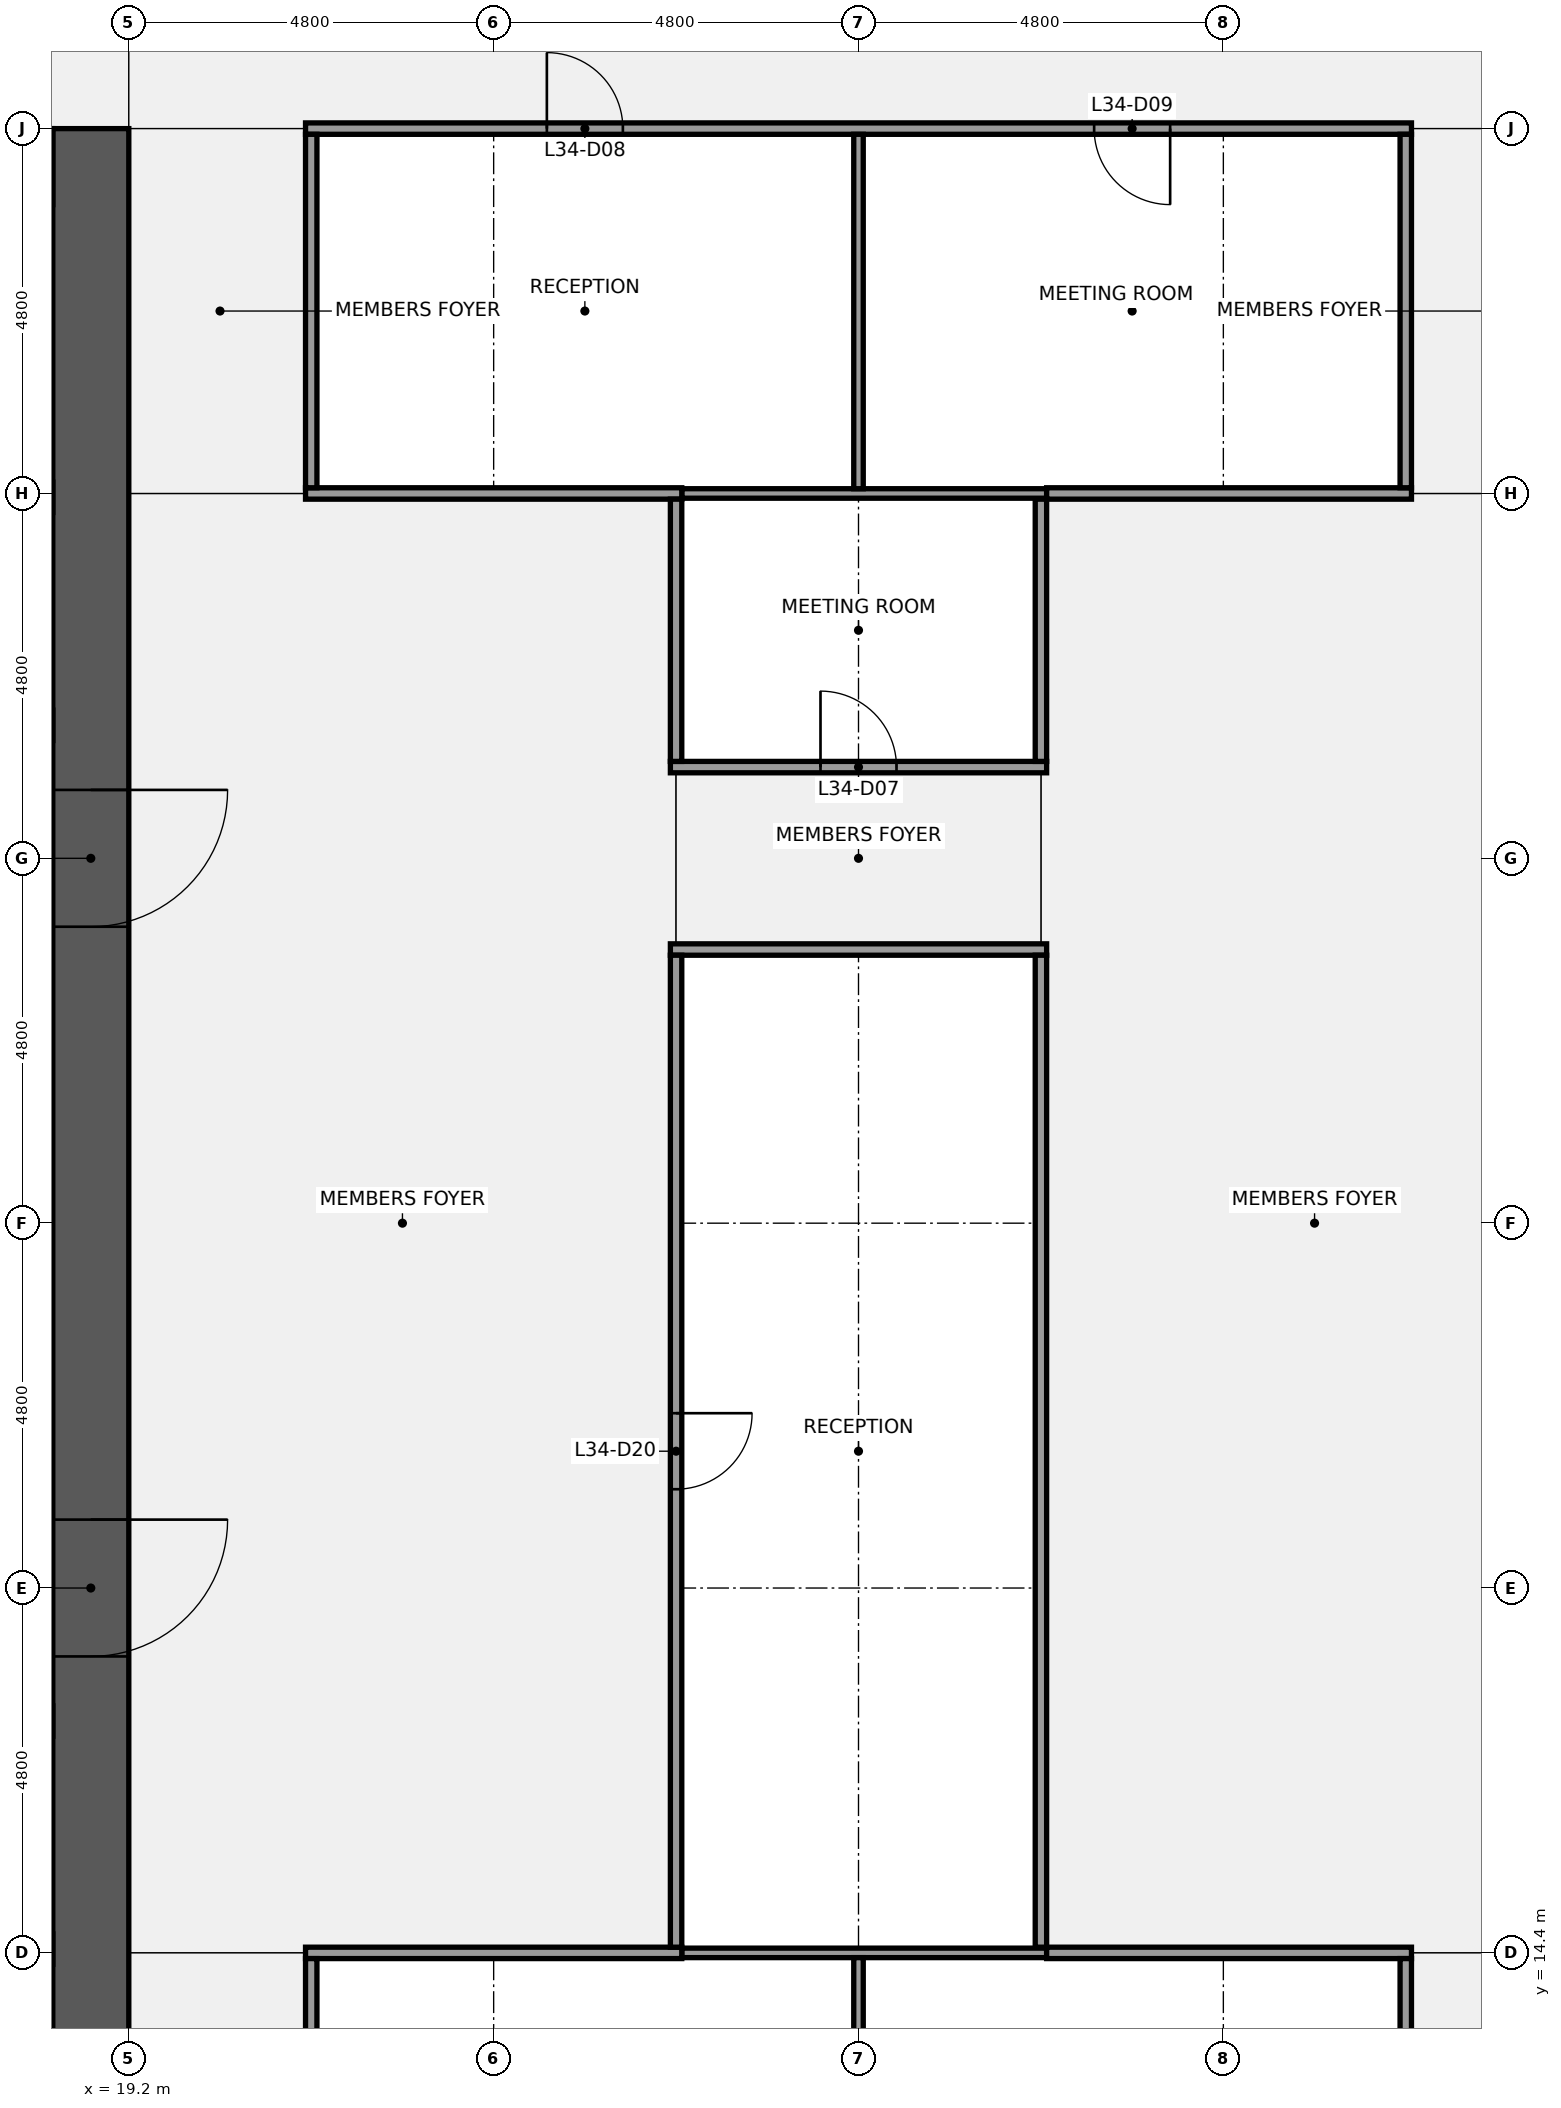
"""IFC4 building model, lengths in metres.
Left out: names, types, materials, properties, quantities, classifications, styles, units other than length and angle.
Written with IfcOpenShell. Run it as: python <this file> out.ifc"""

import sys

from ifc_helpers import new_model, si_unit, direction, frame, frame_2d, origin, place, context, subcontext, project, spatial, rectangle, extrude, element, fill, save


model = new_model("IFC4")
c1 = context("Model", 3, precision=1e-05, world=origin(), true_north=direction((0.0, 1.0)))
c2 = subcontext(c1, "Body", "Model", "MODEL_VIEW")
j1 = project(units=[si_unit("LENGTHUNIT", "METRE"), si_unit("PLANEANGLEUNIT", "RADIAN")], contexts=[c1])
p1 = place(None, origin())
s1 = spatial("IfcSite", under=j1, at=p1, CompositionType="ELEMENT")
p2 = place(p1, origin())
s2 = spatial("IfcBuilding", under=s1, at=p2, CompositionType="ELEMENT")
p3 = place(p2, frame((0.0, 0.0, 156.1)))
s3 = spatial("IfcBuildingStorey", under=s2, at=p3, CompositionType="ELEMENT", Elevation=156.1)
p4 = place(p3, frame((18.7, 38.4, 0.0), z_axis=(0.0, 0.0, 1.0), x_axis=(0.0, -1.0, 0.0)))
e1 = element("IfcWall", 1, at=p4, inside=s3, PredefinedType="SHEAR", context=c2, shape_type="SweptSolid", body=[
    extrude(rectangle(XDim=28.8, YDim=1.0, at=frame_2d((14.4, 0.0))), origin(), (0.0, 0.0, 1.0), 3.84),
])
p5 = place(p4, frame((18.3, 0.0, 0.0)))
e2 = element("IfcOpeningElement", 2, at=p5, cuts=e1, PredefinedType="OPENING", context=c2, shape_type="SweptSolid", body=[
    extrude(rectangle(XDim=1.8, YDim=2.1, at=frame_2d((0.9, 1.05))), frame((0.0, 0.51, 0.0), z_axis=(0.0, -1.0, 0.0), x_axis=(1.0, 0.0, 0.0)), (0.0, 0.0, 1.0), 1.02),
])
p6 = place(p4, frame((8.7, 0.0, 0.0)))
e3 = element("IfcOpeningElement", 3, at=p6, cuts=e1, PredefinedType="OPENING", context=c2, shape_type="SweptSolid", body=[
    extrude(rectangle(XDim=1.8, YDim=2.1, at=frame_2d((0.9, 1.05))), frame((0.0, 0.51, 0.0), z_axis=(0.0, -1.0, 0.0), x_axis=(1.0, 0.0, 0.0)), (0.0, 0.0, 1.0), 1.02),
])
p7 = place(p3, frame((1.0, 14.45, 0.0), z_axis=(0.0, 0.0, 1.0), x_axis=(1.0, 0.0, 0.0)))
e4 = element("IfcWall", 4, at=p7, inside=s3, PredefinedType="SHEAR", context=c2, shape_type="SweptSolid", body=[
    extrude(rectangle(XDim=17.2, YDim=0.4, at=frame_2d((8.6, 0.0))), origin(), (0.0, 0.0, 1.0), 3.84),
])
p8 = place(p3, frame((1.0, 17.45, 0.0), z_axis=(0.0, 0.0, 1.0), x_axis=(1.0, 0.0, 0.0)))
e5 = element("IfcWall", 5, at=p8, inside=s3, PredefinedType="SHEAR", context=c2, shape_type="SweptSolid", body=[
    extrude(rectangle(XDim=17.2, YDim=0.4, at=frame_2d((8.6, 0.0))), origin(), (0.0, 0.0, 1.0), 3.84),
])
p9 = place(p8, frame((0.762, 0.0, 0.0)))
e6 = element("IfcOpeningElement", 6, at=p9, cuts=e5, PredefinedType="OPENING", context=c2, shape_type="SweptSolid", body=[
    extrude(rectangle(XDim=1.0, YDim=2.1, at=frame_2d((0.5, 1.05))), frame((0.0, 0.21, 0.0), z_axis=(0.0, -1.0, 0.0), x_axis=(1.0, 0.0, 0.0)), (0.0, 0.0, 1.0), 0.42),
])
p10 = place(p8, frame((3.3, 0.0, 0.0)))
e7 = element("IfcOpeningElement", 7, at=p10, cuts=e5, PredefinedType="OPENING", context=c2, shape_type="SweptSolid", body=[
    extrude(rectangle(XDim=1.0, YDim=2.1, at=frame_2d((0.5, 1.05))), frame((0.0, 0.21, 0.0), z_axis=(0.0, -1.0, 0.0), x_axis=(1.0, 0.0, 0.0)), (0.0, 0.0, 1.0), 0.42),
])
p11 = place(p8, frame((7.5, 0.0, 0.0)))
e8 = element("IfcOpeningElement", 8, at=p11, cuts=e5, PredefinedType="OPENING", context=c2, shape_type="SweptSolid", body=[
    extrude(rectangle(XDim=1.0, YDim=2.1, at=frame_2d((0.5, 1.05))), frame((0.0, 0.21, 0.0), z_axis=(0.0, -1.0, 0.0), x_axis=(1.0, 0.0, 0.0)), (0.0, 0.0, 1.0), 0.42),
])
p12 = place(p8, frame((12.0, 0.0, 0.0)))
e9 = element("IfcOpeningElement", 9, at=p12, cuts=e5, PredefinedType="OPENING", context=c2, shape_type="SweptSolid", body=[
    extrude(rectangle(XDim=1.0, YDim=2.1, at=frame_2d((0.5, 1.05))), frame((0.0, 0.21, 0.0), z_axis=(0.0, -1.0, 0.0), x_axis=(1.0, 0.0, 0.0)), (0.0, 0.0, 1.0), 0.42),
])
p13 = place(p8, frame((15.137, 0.0, 0.0)))
e10 = element("IfcOpeningElement", 10, at=p13, cuts=e5, PredefinedType="OPENING", context=c2, shape_type="SweptSolid", body=[
    extrude(rectangle(XDim=1.0, YDim=2.1, at=frame_2d((0.5, 1.05))), frame((0.0, 0.21, 0.0), z_axis=(0.0, -1.0, 0.0), x_axis=(1.0, 0.0, 0.0)), (0.0, 0.0, 1.0), 0.42),
])
p14 = place(p3, frame((1.0, 30.55, 0.0), z_axis=(0.0, 0.0, 1.0), x_axis=(1.0, 0.0, 0.0)))
e11 = element("IfcWall", 11, at=p14, inside=s3, PredefinedType="SHEAR", context=c2, shape_type="SweptSolid", body=[
    extrude(rectangle(XDim=17.2, YDim=0.4, at=frame_2d((8.6, 0.0))), origin(), (0.0, 0.0, 1.0), 3.84),
])
p15 = place(p14, frame((0.762, 0.0, 0.0)))
e12 = element("IfcOpeningElement", 12, at=p15, cuts=e11, PredefinedType="OPENING", context=c2, shape_type="SweptSolid", body=[
    extrude(rectangle(XDim=1.0, YDim=2.1, at=frame_2d((0.5, 1.05))), frame((0.0, 0.21, 0.0), z_axis=(0.0, -1.0, 0.0), x_axis=(1.0, 0.0, 0.0)), (0.0, 0.0, 1.0), 0.42),
])
p16 = place(p14, frame((3.3, 0.0, 0.0)))
e13 = element("IfcOpeningElement", 13, at=p16, cuts=e11, PredefinedType="OPENING", context=c2, shape_type="SweptSolid", body=[
    extrude(rectangle(XDim=1.0, YDim=2.1, at=frame_2d((0.5, 1.05))), frame((0.0, 0.21, 0.0), z_axis=(0.0, -1.0, 0.0), x_axis=(1.0, 0.0, 0.0)), (0.0, 0.0, 1.0), 0.42),
])
p17 = place(p14, frame((7.5, 0.0, 0.0)))
e14 = element("IfcOpeningElement", 14, at=p17, cuts=e11, PredefinedType="OPENING", context=c2, shape_type="SweptSolid", body=[
    extrude(rectangle(XDim=1.0, YDim=2.1, at=frame_2d((0.5, 1.05))), frame((0.0, 0.21, 0.0), z_axis=(0.0, -1.0, 0.0), x_axis=(1.0, 0.0, 0.0)), (0.0, 0.0, 1.0), 0.42),
])
p18 = place(p14, frame((12.0, 0.0, 0.0)))
e15 = element("IfcOpeningElement", 15, at=p18, cuts=e11, PredefinedType="OPENING", context=c2, shape_type="SweptSolid", body=[
    extrude(rectangle(XDim=1.0, YDim=2.1, at=frame_2d((0.5, 1.05))), frame((0.0, 0.21, 0.0), z_axis=(0.0, -1.0, 0.0), x_axis=(1.0, 0.0, 0.0)), (0.0, 0.0, 1.0), 0.42),
])
p19 = place(p14, frame((15.137, 0.0, 0.0)))
e16 = element("IfcOpeningElement", 16, at=p19, cuts=e11, PredefinedType="OPENING", context=c2, shape_type="SweptSolid", body=[
    extrude(rectangle(XDim=1.0, YDim=2.1, at=frame_2d((0.5, 1.05))), frame((0.0, 0.21, 0.0), z_axis=(0.0, -1.0, 0.0), x_axis=(1.0, 0.0, 0.0)), (0.0, 0.0, 1.0), 0.42),
])
p20 = place(p3, frame((1.0, 33.55, 0.0), z_axis=(0.0, 0.0, 1.0), x_axis=(1.0, 0.0, 0.0)))
e17 = element("IfcWall", 17, at=p20, inside=s3, PredefinedType="SHEAR", context=c2, shape_type="SweptSolid", body=[
    extrude(rectangle(XDim=17.2, YDim=0.4, at=frame_2d((8.6, 0.0))), origin(), (0.0, 0.0, 1.0), 3.84),
])
p21 = place(p3, frame((26.475, 14.4, 0.0), z_axis=(0.0, 0.0, 1.0), x_axis=(1.0, 0.0, 0.0)))
e18 = element("IfcWall", 18, at=p21, inside=s3, PredefinedType="PARTITIONING", context=c2, shape_type="SweptSolid", body=[
    extrude(rectangle(XDim=4.8, YDim=0.125, at=frame_2d((2.4, 0.0))), origin(), (0.0, 0.0, 1.0), 2.936),
])
p22 = place(p3, frame((21.525, 14.4, 0.0), z_axis=(0.0, 0.0, 1.0), x_axis=(1.0, 0.0, 0.0)))
e19 = element("IfcWall", 19, at=p22, inside=s3, PredefinedType="PARTITIONING", context=c2, shape_type="SweptSolid", body=[
    extrude(rectangle(XDim=4.95, YDim=0.15, at=frame_2d((2.475, 0.0))), origin(), (0.0, 0.0, 1.0), 2.936),
])
p23 = place(p3, frame((31.275, 14.4, 0.0), z_axis=(0.0, 0.0, 1.0), x_axis=(1.0, 0.0, 0.0)))
e20 = element("IfcWall", 20, at=p23, inside=s3, PredefinedType="PARTITIONING", context=c2, shape_type="SweptSolid", body=[
    extrude(rectangle(XDim=4.8, YDim=0.15, at=frame_2d((2.4, 0.0))), origin(), (0.0, 0.0, 1.0), 2.936),
])
p24 = place(p3, frame((26.325, 27.6, 0.0), z_axis=(0.0, 0.0, 1.0), x_axis=(1.0, 0.0, 0.0)))
e21 = element("IfcWall", 21, at=p24, inside=s3, PredefinedType="PARTITIONING", context=c2, shape_type="SweptSolid", body=[
    extrude(rectangle(XDim=4.95, YDim=0.15, at=frame_2d((2.475, 0.0))), origin(), (0.0, 0.0, 1.0), 2.936),
])
p25 = place(p3, frame((26.325, 30.0, 0.0), z_axis=(0.0, 0.0, 1.0), x_axis=(1.0, 0.0, 0.0)))
e22 = element("IfcWall", 22, at=p25, inside=s3, PredefinedType="PARTITIONING", context=c2, shape_type="SweptSolid", body=[
    extrude(rectangle(XDim=4.95, YDim=0.15, at=frame_2d((2.475, 0.0))), origin(), (0.0, 0.0, 1.0), 2.936),
])
p26 = place(p25, frame((1.975, 0.0, 0.0)))
e23 = element("IfcOpeningElement", 23, at=p26, cuts=e22, PredefinedType="OPENING", context=c2, shape_type="SweptSolid", body=[
    extrude(rectangle(XDim=1.0, YDim=2.1, at=frame_2d((0.5, 1.05))), frame((0.0, 0.085, 0.0), z_axis=(0.0, -1.0, 0.0), x_axis=(1.0, 0.0, 0.0)), (0.0, 0.0, 1.0), 0.17),
])
p27 = place(p3, frame((26.475, 33.6, 0.0), z_axis=(0.0, 0.0, 1.0), x_axis=(1.0, 0.0, 0.0)))
e24 = element("IfcWall", 24, at=p27, inside=s3, PredefinedType="PARTITIONING", context=c2, shape_type="SweptSolid", body=[
    extrude(rectangle(XDim=4.8, YDim=0.125, at=frame_2d((2.4, 0.0))), origin(), (0.0, 0.0, 1.0), 2.936),
])
p28 = place(p3, frame((21.525, 33.6, 0.0), z_axis=(0.0, 0.0, 1.0), x_axis=(1.0, 0.0, 0.0)))
e25 = element("IfcWall", 25, at=p28, inside=s3, PredefinedType="PARTITIONING", context=c2, shape_type="SweptSolid", body=[
    extrude(rectangle(XDim=4.95, YDim=0.15, at=frame_2d((2.475, 0.0))), origin(), (0.0, 0.0, 1.0), 2.936),
])
p29 = place(p3, frame((31.275, 33.6, 0.0), z_axis=(0.0, 0.0, 1.0), x_axis=(1.0, 0.0, 0.0)))
e26 = element("IfcWall", 26, at=p29, inside=s3, PredefinedType="PARTITIONING", context=c2, shape_type="SweptSolid", body=[
    extrude(rectangle(XDim=4.8, YDim=0.15, at=frame_2d((2.4, 0.0))), origin(), (0.0, 0.0, 1.0), 2.936),
])
p30 = place(p3, frame((21.525, 38.4, 0.0), z_axis=(0.0, 0.0, 1.0), x_axis=(1.0, 0.0, 0.0)))
e27 = element("IfcWall", 27, at=p30, inside=s3, PredefinedType="PARTITIONING", context=c2, shape_type="SweptSolid", body=[
    extrude(rectangle(XDim=14.55, YDim=0.15, at=frame_2d((7.275, 0.0))), origin(), (0.0, 0.0, 1.0), 2.936),
])
p31 = place(p30, frame((3.175, 0.0, 0.0)))
e28 = element("IfcOpeningElement", 28, at=p31, cuts=e27, PredefinedType="OPENING", context=c2, shape_type="SweptSolid", body=[
    extrude(rectangle(XDim=1.0, YDim=2.1, at=frame_2d((0.5, 1.05))), frame((0.0, 0.085, 0.0), z_axis=(0.0, -1.0, 0.0), x_axis=(1.0, 0.0, 0.0)), (0.0, 0.0, 1.0), 0.17),
])
p32 = place(p30, frame((10.375, 0.0, 0.0)))
e29 = element("IfcOpeningElement", 29, at=p32, cuts=e27, PredefinedType="OPENING", context=c2, shape_type="SweptSolid", body=[
    extrude(rectangle(XDim=1.0, YDim=2.1, at=frame_2d((0.5, 1.05))), frame((0.0, 0.085, 0.0), z_axis=(0.0, -1.0, 0.0), x_axis=(1.0, 0.0, 0.0)), (0.0, 0.0, 1.0), 0.17),
])
for number, where, z_axis, x_axis in (
    (30, (21.6, 9.675, 0.0), (0.0, 0.0, 1.0), (0.0, 1.0, 0.0)),
    (31, (21.6, 33.675, 0.0), (0.0, 0.0, 1.0), (0.0, 1.0, 0.0)),
):
    element("IfcWall", number, at=place(p3, frame(where, z_axis=z_axis, x_axis=x_axis)), inside=s3, PredefinedType="PARTITIONING", context=c2, shape_type="SweptSolid", body=[
        extrude(rectangle(XDim=4.65, YDim=0.15, at=frame_2d((2.325, 0.0))), origin(), (0.0, 0.0, 1.0), 2.936),
    ])
p33 = place(p3, frame((26.4, 14.475, 0.0), z_axis=(0.0, 0.0, 1.0), x_axis=(0.0, 1.0, 0.0)))
e32 = element("IfcWall", 32, at=p33, inside=s3, PredefinedType="PARTITIONING", context=c2, shape_type="SweptSolid", body=[
    extrude(rectangle(XDim=13.05, YDim=0.15, at=frame_2d((6.525, 0.0))), origin(), (0.0, 0.0, 1.0), 2.936),
])
p34 = place(p33, frame((6.025, 0.0, 0.0)))
e33 = element("IfcOpeningElement", 33, at=p34, cuts=e32, PredefinedType="OPENING", context=c2, shape_type="SweptSolid", body=[
    extrude(rectangle(XDim=1.0, YDim=2.1, at=frame_2d((0.5, 1.05))), frame((0.0, 0.085, 0.0), z_axis=(0.0, -1.0, 0.0), x_axis=(1.0, 0.0, 0.0)), (0.0, 0.0, 1.0), 0.17),
])
p35 = place(p3, frame((26.4, 30.075, 0.0), z_axis=(0.0, 0.0, 1.0), x_axis=(0.0, 1.0, 0.0)))
e34 = element("IfcWall", 34, at=p35, inside=s3, PredefinedType="PARTITIONING", context=c2, shape_type="SweptSolid", body=[
    extrude(rectangle(XDim=3.45, YDim=0.15, at=frame_2d((1.725, 0.0))), origin(), (0.0, 0.0, 1.0), 2.936),
])
for number, where, z_axis, x_axis in (
    (35, (28.8, 9.675, 0.0), (0.0, 0.0, 1.0), (0.0, 1.0, 0.0)),
    (36, (28.8, 33.663, 0.0), (0.0, 0.0, 1.0), (0.0, 1.0, 0.0)),
):
    element("IfcWall", number, at=place(p3, frame(where, z_axis=z_axis, x_axis=x_axis)), inside=s3, PredefinedType="PARTITIONING", context=c2, shape_type="SweptSolid", body=[
        extrude(rectangle(XDim=4.662, YDim=0.125, at=frame_2d((2.331, 0.0))), origin(), (0.0, 0.0, 1.0), 2.936),
    ])
p36 = place(p3, frame((31.2, 14.475, 0.0), z_axis=(0.0, 0.0, 1.0), x_axis=(0.0, 1.0, 0.0)))
e37 = element("IfcWall", 37, at=p36, inside=s3, PredefinedType="PARTITIONING", context=c2, shape_type="SweptSolid", body=[
    extrude(rectangle(XDim=13.05, YDim=0.15, at=frame_2d((6.525, 0.0))), origin(), (0.0, 0.0, 1.0), 2.936),
])
p37 = place(p3, frame((31.2, 30.075, 0.0), z_axis=(0.0, 0.0, 1.0), x_axis=(0.0, 1.0, 0.0)))
e38 = element("IfcWall", 38, at=p37, inside=s3, PredefinedType="PARTITIONING", context=c2, shape_type="SweptSolid", body=[
    extrude(rectangle(XDim=3.45, YDim=0.15, at=frame_2d((1.725, 0.0))), origin(), (0.0, 0.0, 1.0), 2.936),
])
for number, where, z_axis, x_axis in (
    (39, (36.0, 9.675, 0.0), (0.0, 0.0, 1.0), (0.0, 1.0, 0.0)),
    (40, (36.0, 33.675, 0.0), (0.0, 0.0, 1.0), (0.0, 1.0, 0.0)),
):
    element("IfcWall", number, at=place(p3, frame(where, z_axis=z_axis, x_axis=x_axis)), inside=s3, PredefinedType="PARTITIONING", context=c2, shape_type="SweptSolid", body=[
        extrude(rectangle(XDim=4.65, YDim=0.15, at=frame_2d((2.325, 0.0))), origin(), (0.0, 0.0, 1.0), 2.936),
    ])
p38 = place(p5, origin())
e41 = element("IfcDoor", 41, at=p38, inside=s3, OperationType="DOUBLE_DOOR_SINGLE_SWING", PredefinedType="DOOR", context=c2, shape_type="SweptSolid", body=[
    extrude(rectangle(XDim=1.8, YDim=2.1, at=frame_2d((0.9, 1.05))), frame((0.0, 0.025, 0.0), z_axis=(0.0, -1.0, 0.0), x_axis=(1.0, 0.0, 0.0)), (0.0, 0.0, 1.0), 0.05),
])
fill(e2, e41)
p39 = place(p6, origin())
e42 = element("IfcDoor", 42, at=p39, inside=s3, OperationType="DOUBLE_DOOR_SINGLE_SWING", PredefinedType="DOOR", context=c2, shape_type="SweptSolid", body=[
    extrude(rectangle(XDim=1.8, YDim=2.1, at=frame_2d((0.9, 1.05))), frame((0.0, 0.025, 0.0), z_axis=(0.0, -1.0, 0.0), x_axis=(1.0, 0.0, 0.0)), (0.0, 0.0, 1.0), 0.05),
])
fill(e3, e42)
p40 = place(p26, origin())
e43 = element("IfcDoor", 43, at=p40, inside=s3, OperationType="SINGLE_SWING_LEFT", PredefinedType="DOOR", context=c2, shape_type="SweptSolid", body=[
    extrude(rectangle(XDim=1.0, YDim=2.1, at=frame_2d((0.5, 1.05))), frame((0.0, 0.025, 0.0), z_axis=(0.0, -1.0, 0.0), x_axis=(1.0, 0.0, 0.0)), (0.0, 0.0, 1.0), 0.05),
])
fill(e23, e43)
p41 = place(p31, origin())
e44 = element("IfcDoor", 44, at=p41, inside=s3, OperationType="SINGLE_SWING_LEFT", PredefinedType="DOOR", context=c2, shape_type="SweptSolid", body=[
    extrude(rectangle(XDim=1.0, YDim=2.1, at=frame_2d((0.5, 1.05))), frame((0.0, 0.025, 0.0), z_axis=(0.0, -1.0, 0.0), x_axis=(1.0, 0.0, 0.0)), (0.0, 0.0, 1.0), 0.05),
])
fill(e28, e44)
p42 = place(p32, origin())
e45 = element("IfcDoor", 45, at=p42, inside=s3, OperationType="SINGLE_SWING_RIGHT", PredefinedType="DOOR", context=c2, shape_type="SweptSolid", body=[
    extrude(rectangle(XDim=1.0, YDim=2.1, at=frame_2d((0.5, 1.05))), frame((0.0, 0.025, 0.0), z_axis=(0.0, -1.0, 0.0), x_axis=(1.0, 0.0, 0.0)), (0.0, 0.0, 1.0), 0.05),
])
fill(e29, e45)
p43 = place(p34, origin())
e46 = element("IfcDoor", 46, at=p43, inside=s3, OperationType="SINGLE_SWING_RIGHT", PredefinedType="DOOR", context=c2, shape_type="SweptSolid", body=[
    extrude(rectangle(XDim=1.0, YDim=2.1, at=frame_2d((0.5, 1.05))), frame((0.0, 0.025, 0.0), z_axis=(0.0, -1.0, 0.0), x_axis=(1.0, 0.0, 0.0)), (0.0, 0.0, 1.0), 0.05),
])
fill(e33, e46)
save(model, sys.argv[1])
